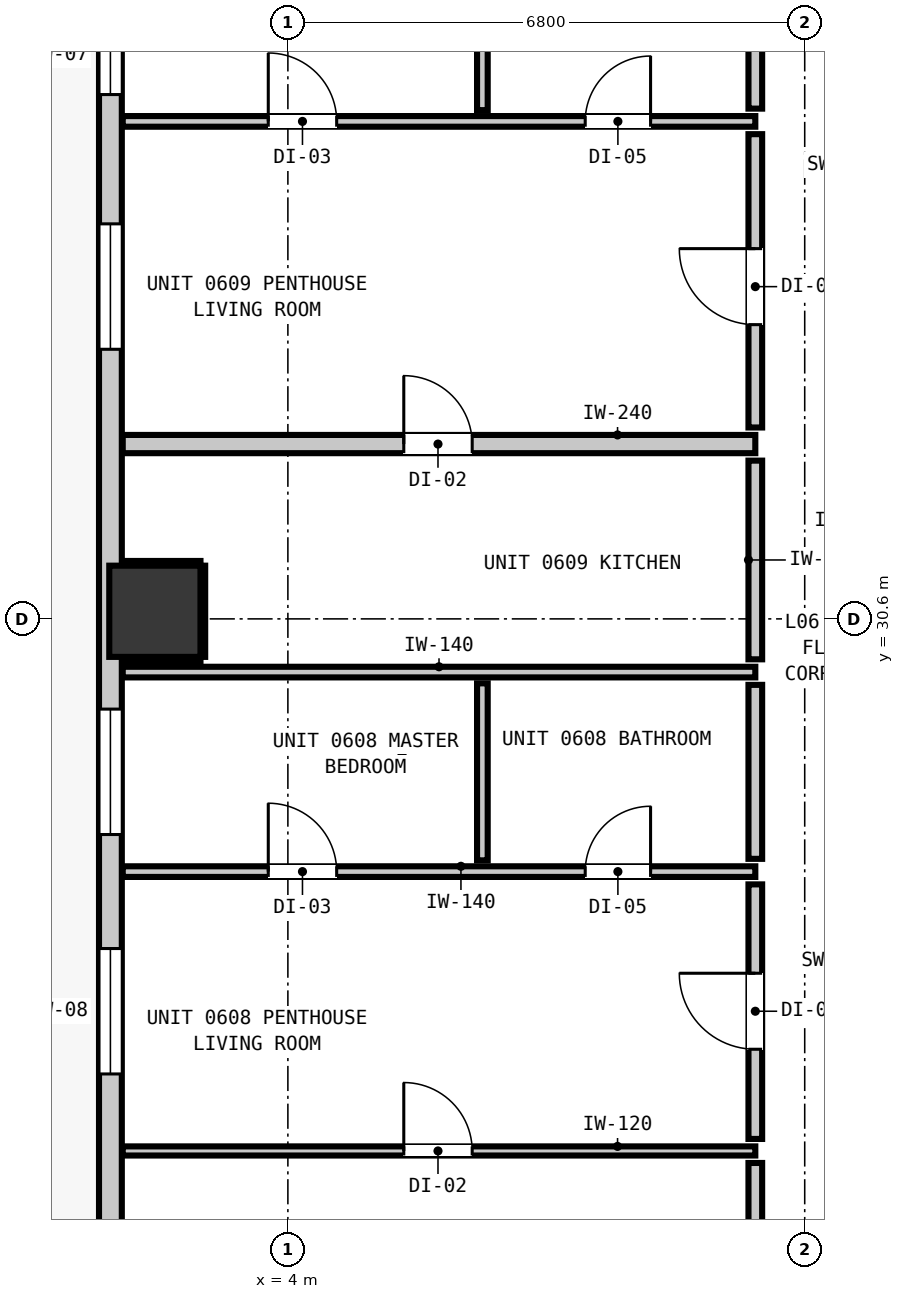
"""IFC4 building model, lengths in metres.
Left out: names, types, materials, properties, quantities, classifications, styles, units other than length and angle.
Written with IfcOpenShell. Run it as: python <this file> out.ifc"""

import sys

from ifc_helpers import new_model, si_unit, direction, frame, frame_2d, origin, origin_2d, place, context, subcontext, project, spatial, rectangle, extrude, element, fill, save


model = new_model("IFC4")
c1 = context("Model", 3, precision=1e-05, world=origin(), true_north=direction((0.0, 1.0)))
c2 = subcontext(c1, "Body", "Model", "MODEL_VIEW")
j1 = project(units=[si_unit("LENGTHUNIT", "METRE"), si_unit("PLANEANGLEUNIT", "RADIAN")], contexts=[c1])
p1 = place(None, origin())
s1 = spatial("IfcSite", under=j1, at=p1, CompositionType="ELEMENT")
p2 = place(p1, origin())
s2 = spatial("IfcBuilding", under=s1, at=p2, CompositionType="ELEMENT")
p3 = place(p2, frame((0.0, 0.0, 25.32)))
s3 = spatial("IfcBuildingStorey", under=s2, at=p3, CompositionType="ELEMENT", Elevation=25.32)
p4 = place(p3, frame((2.25, 30.7, 0.0), z_axis=(0.0, 0.0, 1.0), x_axis=(1.0, 0.0, 0.0)))
e1 = element("IfcColumn", 1, at=p4, inside=s3, PredefinedType="COLUMN", context=c2, shape_type="SweptSolid", body=[
    extrude(rectangle(XDim=1.2, YDim=1.2, at=origin_2d()), origin(), (0.0, 0.0, 1.0), 3.32),
])
p5 = place(p3, frame((1.665, 10.165, 0.0), z_axis=(0.0, 0.0, 1.0), x_axis=(0.0, 1.0, 0.0)))
e2 = element("IfcWall", 2, at=p5, inside=s3, PredefinedType="STANDARD", context=c2, shape_type="SweptSolid", body=[
    extrude(rectangle(XDim=34.67, YDim=0.3, at=frame_2d((17.335, 0.0))), origin(), (0.0, 0.0, 1.0), 3.06),
])
p6 = place(p5, frame((3.352, 0.0, 0.0)))
e3 = element("IfcOpeningElement", 3, at=p6, cuts=e2, PredefinedType="OPENING", context=c2, shape_type="SweptSolid", body=[
    extrude(rectangle(XDim=1.0, YDim=2.15, at=frame_2d((0.5, 1.075))), frame((0.0, 0.16, 0.0), z_axis=(0.0, -1.0, 0.0), x_axis=(1.0, 0.0, 0.0)), (0.0, 0.0, 1.0), 0.32),
])
p7 = place(p5, frame((14.448, 0.0, 0.85)))
e4 = element("IfcOpeningElement", 4, at=p7, cuts=e2, PredefinedType="OPENING", context=c2, shape_type="SweptSolid", body=[
    extrude(rectangle(XDim=1.65, YDim=1.75, at=frame_2d((0.825, 0.875))), frame((0.0, 0.16, 0.0), z_axis=(0.0, -1.0, 0.0), x_axis=(1.0, 0.0, 0.0)), (0.0, 0.0, 1.0), 0.32),
])
p8 = place(p5, frame((17.598, 0.0, 0.85)))
e5 = element("IfcOpeningElement", 5, at=p8, cuts=e2, PredefinedType="OPENING", context=c2, shape_type="SweptSolid", body=[
    extrude(rectangle(XDim=1.65, YDim=1.75, at=frame_2d((0.825, 0.875))), frame((0.0, 0.16, 0.0), z_axis=(0.0, -1.0, 0.0), x_axis=(1.0, 0.0, 0.0)), (0.0, 0.0, 1.0), 0.32),
])
p9 = place(p5, frame((23.982, 0.0, 0.85)))
e6 = element("IfcOpeningElement", 6, at=p9, cuts=e2, PredefinedType="OPENING", context=c2, shape_type="SweptSolid", body=[
    extrude(rectangle(XDim=1.65, YDim=1.75, at=frame_2d((0.825, 0.875))), frame((0.0, 0.16, 0.0), z_axis=(0.0, -1.0, 0.0), x_axis=(1.0, 0.0, 0.0)), (0.0, 0.0, 1.0), 0.32),
])
p10 = place(p5, frame((27.333, 0.0, 0.85)))
e7 = element("IfcOpeningElement", 7, at=p10, cuts=e2, PredefinedType="OPENING", context=c2, shape_type="SweptSolid", body=[
    extrude(rectangle(XDim=1.05, YDim=1.65, at=frame_2d((0.525, 0.825))), frame((0.0, 0.16, 0.0), z_axis=(0.0, -1.0, 0.0), x_axis=(1.0, 0.0, 0.0)), (0.0, 0.0, 1.0), 0.32),
])
p11 = place(p3, frame((1.827, 32.9, 0.0), z_axis=(0.0, 0.0, 1.0), x_axis=(1.0, 0.0, 0.0)))
e8 = element("IfcWall", 8, at=p11, inside=s3, PredefinedType="PARTITIONING", context=c2, shape_type="SweptSolid", body=[
    extrude(rectangle(XDim=8.323, YDim=0.24, at=frame_2d((4.162, 0.0))), origin(), (0.0, 0.0, 1.0), 3.06),
])
p12 = place(p11, frame((3.698, 0.0, 0.0)))
e9 = element("IfcOpeningElement", 9, at=p12, cuts=e8, PredefinedType="OPENING", context=c2, shape_type="SweptSolid", body=[
    extrude(rectangle(XDim=0.9, YDim=2.1, at=frame_2d((0.45, 1.05))), frame((0.0, 0.13, 0.0), z_axis=(0.0, -1.0, 0.0), x_axis=(1.0, 0.0, 0.0)), (0.0, 0.0, 1.0), 0.26),
])
p13 = place(p3, frame((1.827, 27.275, 0.0), z_axis=(0.0, 0.0, 1.0), x_axis=(1.0, 0.0, 0.0)))
e10 = element("IfcWall", 10, at=p13, inside=s3, PredefinedType="PARTITIONING", context=c2, shape_type="SweptSolid", body=[
    extrude(rectangle(XDim=8.323, YDim=0.14, at=frame_2d((4.162, 0.0))), origin(), (0.0, 0.0, 1.0), 3.06),
])
p14 = place(p13, frame((6.085, 0.0, 0.0)))
e11 = element("IfcOpeningElement", 11, at=p14, cuts=e10, PredefinedType="OPENING", context=c2, shape_type="SweptSolid", body=[
    extrude(rectangle(XDim=0.86, YDim=2.02, at=frame_2d((0.43, 1.01))), frame((0.0, 0.08, 0.0), z_axis=(0.0, -1.0, 0.0), x_axis=(1.0, 0.0, 0.0)), (0.0, 0.0, 1.0), 0.16),
])
p15 = place(p13, frame((1.915, 0.0, 0.0)))
e12 = element("IfcOpeningElement", 12, at=p15, cuts=e10, PredefinedType="OPENING", context=c2, shape_type="SweptSolid", body=[
    extrude(rectangle(XDim=0.9, YDim=2.1, at=frame_2d((0.45, 1.05))), frame((0.0, 0.08, 0.0), z_axis=(0.0, -1.0, 0.0), x_axis=(1.0, 0.0, 0.0)), (0.0, 0.0, 1.0), 0.16),
])
p16 = place(p3, frame((1.827, 29.9, 0.0), z_axis=(0.0, 0.0, 1.0), x_axis=(1.0, 0.0, 0.0)))
e13 = element("IfcWall", 13, at=p16, inside=s3, PredefinedType="PARTITIONING", context=c2, shape_type="SweptSolid", body=[
    extrude(rectangle(XDim=8.323, YDim=0.14, at=frame_2d((4.162, 0.0))), origin(), (0.0, 0.0, 1.0), 3.06),
])
p17 = place(p3, frame((1.827, 37.145, 0.0), z_axis=(0.0, 0.0, 1.0), x_axis=(1.0, 0.0, 0.0)))
e14 = element("IfcWall", 14, at=p17, inside=s3, PredefinedType="PARTITIONING", context=c2, shape_type="SweptSolid", body=[
    extrude(rectangle(XDim=8.323, YDim=0.14, at=frame_2d((4.162, 0.0))), origin(), (0.0, 0.0, 1.0), 3.06),
])
p18 = place(p17, frame((6.085, 0.0, 0.0)))
e15 = element("IfcOpeningElement", 15, at=p18, cuts=e14, PredefinedType="OPENING", context=c2, shape_type="SweptSolid", body=[
    extrude(rectangle(XDim=0.86, YDim=2.02, at=frame_2d((0.43, 1.01))), frame((0.0, 0.08, 0.0), z_axis=(0.0, -1.0, 0.0), x_axis=(1.0, 0.0, 0.0)), (0.0, 0.0, 1.0), 0.16),
])
p19 = place(p17, frame((1.915, 0.0, 0.0)))
e16 = element("IfcOpeningElement", 16, at=p19, cuts=e14, PredefinedType="OPENING", context=c2, shape_type="SweptSolid", body=[
    extrude(rectangle(XDim=0.9, YDim=2.1, at=frame_2d((0.45, 1.05))), frame((0.0, 0.08, 0.0), z_axis=(0.0, -1.0, 0.0), x_axis=(1.0, 0.0, 0.0)), (0.0, 0.0, 1.0), 0.16),
])
p20 = place(p3, frame((1.827, 23.6, 0.0), z_axis=(0.0, 0.0, 1.0), x_axis=(1.0, 0.0, 0.0)))
e17 = element("IfcWall", 17, at=p20, inside=s3, PredefinedType="PARTITIONING", context=c2, shape_type="SweptSolid", body=[
    extrude(rectangle(XDim=8.323, YDim=0.12, at=frame_2d((4.162, 0.0))), origin(), (0.0, 0.0, 1.0), 3.06),
])
p21 = place(p20, frame((3.698, 0.0, 0.0)))
e18 = element("IfcOpeningElement", 18, at=p21, cuts=e17, PredefinedType="OPENING", context=c2, shape_type="SweptSolid", body=[
    extrude(rectangle(XDim=0.9, YDim=2.1, at=frame_2d((0.45, 1.05))), frame((0.0, 0.07, 0.0), z_axis=(0.0, -1.0, 0.0), x_axis=(1.0, 0.0, 0.0)), (0.0, 0.0, 1.0), 0.14),
])
p22 = place(p3, frame((10.15, 21.368, 0.0), z_axis=(0.0, 0.0, 1.0), x_axis=(0.0, 1.0, 0.0)))
e19 = element("IfcWall", 19, at=p22, inside=s3, PredefinedType="PARTITIONING", context=c2, shape_type="SweptSolid", body=[
    extrude(rectangle(XDim=2.074, YDim=0.18, at=frame_2d((1.037, 0.0))), origin(), (0.0, 0.0, 1.0), 3.06),
])
p23 = place(p3, frame((10.15, 23.758, 0.0), z_axis=(0.0, 0.0, 1.0), x_axis=(0.0, 1.0, 0.0)))
e20 = element("IfcWall", 20, at=p23, inside=s3, PredefinedType="PARTITIONING", context=c2, shape_type="SweptSolid", body=[
    extrude(rectangle(XDim=3.349, YDim=0.18, at=frame_2d((1.674, 0.0))), origin(), (0.0, 0.0, 1.0), 3.06),
])
p24 = place(p23, frame((1.18, 0.0, 0.0)))
e21 = element("IfcOpeningElement", 21, at=p24, cuts=e20, PredefinedType="OPENING", context=c2, shape_type="SweptSolid", body=[
    extrude(rectangle(XDim=1.0, YDim=2.15, at=frame_2d((0.5, 1.075))), frame((0.0, 0.1, 0.0), z_axis=(0.0, -1.0, 0.0), x_axis=(1.0, 0.0, 0.0)), (0.0, 0.0, 1.0), 0.2),
])
p25 = place(p3, frame((10.15, 27.443, 0.0), z_axis=(0.0, 0.0, 1.0), x_axis=(0.0, 1.0, 0.0)))
e22 = element("IfcWall", 22, at=p25, inside=s3, PredefinedType="PARTITIONING", context=c2, shape_type="SweptSolid", body=[
    extrude(rectangle(XDim=2.289, YDim=0.18, at=frame_2d((1.145, 0.0))), origin(), (0.0, 0.0, 1.0), 3.06),
])
p26 = place(p3, frame((10.15, 30.068, 0.0), z_axis=(0.0, 0.0, 1.0), x_axis=(0.0, 1.0, 0.0)))
e23 = element("IfcWall", 23, at=p26, inside=s3, PredefinedType="PARTITIONING", context=c2, shape_type="SweptSolid", body=[
    extrude(rectangle(XDim=2.614, YDim=0.18, at=frame_2d((1.307, 0.0))), origin(), (0.0, 0.0, 1.0), 3.06),
])
p27 = place(p3, frame((10.15, 33.118, 0.0), z_axis=(0.0, 0.0, 1.0), x_axis=(0.0, 1.0, 0.0)))
e24 = element("IfcWall", 24, at=p27, inside=s3, PredefinedType="PARTITIONING", context=c2, shape_type="SweptSolid", body=[
    extrude(rectangle(XDim=3.859, YDim=0.18, at=frame_2d((1.93, 0.0))), origin(), (0.0, 0.0, 1.0), 3.06),
])
p28 = place(p27, frame((1.353, 0.0, 0.0)))
e25 = element("IfcOpeningElement", 25, at=p28, cuts=e24, PredefinedType="OPENING", context=c2, shape_type="SweptSolid", body=[
    extrude(rectangle(XDim=1.0, YDim=2.15, at=frame_2d((0.5, 1.075))), frame((0.0, 0.1, 0.0), z_axis=(0.0, -1.0, 0.0), x_axis=(1.0, 0.0, 0.0)), (0.0, 0.0, 1.0), 0.2),
])
p29 = place(p3, frame((10.15, 37.313, 0.0), z_axis=(0.0, 0.0, 1.0), x_axis=(0.0, 1.0, 0.0)))
e26 = element("IfcWall", 26, at=p29, inside=s3, PredefinedType="PARTITIONING", context=c2, shape_type="SweptSolid", body=[
    extrude(rectangle(XDim=2.749, YDim=0.18, at=frame_2d((1.375, 0.0))), origin(), (0.0, 0.0, 1.0), 3.06),
])
p30 = place(p3, frame((6.559, 27.423, 0.0), z_axis=(0.0, 0.0, 1.0), x_axis=(0.0, 1.0, 0.0)))
e27 = element("IfcWall", 27, at=p30, inside=s3, PredefinedType="PARTITIONING", context=c2, shape_type="SweptSolid", body=[
    extrude(rectangle(XDim=2.329, YDim=0.14, at=frame_2d((1.165, 0.0))), origin(), (0.0, 0.0, 1.0), 3.06),
])
p31 = place(p3, frame((6.559, 37.293, 0.0), z_axis=(0.0, 0.0, 1.0), x_axis=(0.0, 1.0, 0.0)))
e28 = element("IfcWall", 28, at=p31, inside=s3, PredefinedType="PARTITIONING", context=c2, shape_type="SweptSolid", body=[
    extrude(rectangle(XDim=2.789, YDim=0.14, at=frame_2d((1.395, 0.0))), origin(), (0.0, 0.0, 1.0), 3.06),
])
for number, where, z_axis, x_axis in (
    (29, (1.83, 30.068, 0.0), (0.0, 0.0, 1.0), (1.0, 0.0, 0.0)),
    (30, (1.83, 31.332, 0.0), (0.0, 0.0, 1.0), (1.0, 0.0, 0.0)),
):
    element("IfcWall", number, at=place(p3, frame(where, z_axis=z_axis, x_axis=x_axis)), inside=s3, PredefinedType="PARTITIONING", context=c2, shape_type="SweptSolid", body=[
        extrude(rectangle(XDim=1.02, YDim=0.06, at=frame_2d((0.51, 0.0))), origin(), (0.0, 0.0, 1.0), 1.45),
    ])
p32 = place(p3, frame((2.882, 30.1, 0.0), z_axis=(0.0, 0.0, 1.0), x_axis=(0.0, 1.0, 0.0)))
e31 = element("IfcWall", 31, at=p32, inside=s3, PredefinedType="PARTITIONING", context=c2, shape_type="SweptSolid", body=[
    extrude(rectangle(XDim=1.2, YDim=0.06, at=frame_2d((0.6, 0.0))), origin(), (0.0, 0.0, 1.0), 1.45),
])
p33 = place(p7, origin())
e32 = element("IfcWindow", 32, at=p33, inside=s3, PartitioningType="SINGLE_PANEL", PredefinedType="WINDOW", context=c2, shape_type="SweptSolid", body=[
    extrude(rectangle(XDim=1.65, YDim=1.75, at=frame_2d((0.825, 0.875))), frame((0.0, 0.03, 0.0), z_axis=(0.0, -1.0, 0.0), x_axis=(1.0, 0.0, 0.0)), (0.0, 0.0, 1.0), 0.06),
])
fill(e4, e32)
p34 = place(p8, origin())
e33 = element("IfcWindow", 33, at=p34, inside=s3, PartitioningType="SINGLE_PANEL", PredefinedType="WINDOW", context=c2, shape_type="SweptSolid", body=[
    extrude(rectangle(XDim=1.65, YDim=1.75, at=frame_2d((0.825, 0.875))), frame((0.0, 0.03, 0.0), z_axis=(0.0, -1.0, 0.0), x_axis=(1.0, 0.0, 0.0)), (0.0, 0.0, 1.0), 0.06),
])
fill(e5, e33)
p35 = place(p9, origin())
e34 = element("IfcWindow", 34, at=p35, inside=s3, PartitioningType="SINGLE_PANEL", PredefinedType="WINDOW", context=c2, shape_type="SweptSolid", body=[
    extrude(rectangle(XDim=1.65, YDim=1.75, at=frame_2d((0.825, 0.875))), frame((0.0, 0.03, 0.0), z_axis=(0.0, -1.0, 0.0), x_axis=(1.0, 0.0, 0.0)), (0.0, 0.0, 1.0), 0.06),
])
fill(e6, e34)
p36 = place(p10, origin())
e35 = element("IfcWindow", 35, at=p36, inside=s3, PartitioningType="SINGLE_PANEL", PredefinedType="WINDOW", context=c2, shape_type="SweptSolid", body=[
    extrude(rectangle(XDim=1.05, YDim=1.65, at=frame_2d((0.525, 0.825))), frame((0.0, 0.03, 0.0), z_axis=(0.0, -1.0, 0.0), x_axis=(1.0, 0.0, 0.0)), (0.0, 0.0, 1.0), 0.06),
])
fill(e7, e35)
p37 = place(p24, origin())
e36 = element("IfcDoor", 36, at=p37, inside=s3, OperationType="SINGLE_SWING_RIGHT", PredefinedType="DOOR", context=c2, shape_type="SweptSolid", body=[
    extrude(rectangle(XDim=1.0, YDim=2.15, at=frame_2d((0.5, 1.075))), frame((0.0, 0.025, 0.0), z_axis=(0.0, -1.0, 0.0), x_axis=(1.0, 0.0, 0.0)), (0.0, 0.0, 1.0), 0.05),
])
fill(e21, e36)
p38 = place(p21, origin())
e37 = element("IfcDoor", 37, at=p38, inside=s3, OperationType="SINGLE_SWING_LEFT", PredefinedType="DOOR", context=c2, shape_type="SweptSolid", body=[
    extrude(rectangle(XDim=0.9, YDim=2.1, at=frame_2d((0.45, 1.05))), frame((0.0, 0.025, 0.0), z_axis=(0.0, -1.0, 0.0), x_axis=(1.0, 0.0, 0.0)), (0.0, 0.0, 1.0), 0.05),
])
fill(e18, e37)
p39 = place(p14, origin())
e38 = element("IfcDoor", 38, at=p39, inside=s3, OperationType="SINGLE_SWING_RIGHT", PredefinedType="DOOR", context=c2, shape_type="SweptSolid", body=[
    extrude(rectangle(XDim=0.86, YDim=2.02, at=frame_2d((0.43, 1.01))), frame((0.0, 0.025, 0.0), z_axis=(0.0, -1.0, 0.0), x_axis=(1.0, 0.0, 0.0)), (0.0, 0.0, 1.0), 0.05),
])
fill(e11, e38)
p40 = place(p15, origin())
e39 = element("IfcDoor", 39, at=p40, inside=s3, OperationType="SINGLE_SWING_LEFT", PredefinedType="DOOR", context=c2, shape_type="SweptSolid", body=[
    extrude(rectangle(XDim=0.9, YDim=2.1, at=frame_2d((0.45, 1.05))), frame((0.0, 0.025, 0.0), z_axis=(0.0, -1.0, 0.0), x_axis=(1.0, 0.0, 0.0)), (0.0, 0.0, 1.0), 0.05),
])
fill(e12, e39)
p41 = place(p28, origin())
e40 = element("IfcDoor", 40, at=p41, inside=s3, OperationType="SINGLE_SWING_RIGHT", PredefinedType="DOOR", context=c2, shape_type="SweptSolid", body=[
    extrude(rectangle(XDim=1.0, YDim=2.15, at=frame_2d((0.5, 1.075))), frame((0.0, 0.025, 0.0), z_axis=(0.0, -1.0, 0.0), x_axis=(1.0, 0.0, 0.0)), (0.0, 0.0, 1.0), 0.05),
])
fill(e25, e40)
p42 = place(p12, origin())
e41 = element("IfcDoor", 41, at=p42, inside=s3, OperationType="SINGLE_SWING_LEFT", PredefinedType="DOOR", context=c2, shape_type="SweptSolid", body=[
    extrude(rectangle(XDim=0.9, YDim=2.1, at=frame_2d((0.45, 1.05))), frame((0.0, 0.025, 0.0), z_axis=(0.0, -1.0, 0.0), x_axis=(1.0, 0.0, 0.0)), (0.0, 0.0, 1.0), 0.05),
])
fill(e9, e41)
p43 = place(p18, origin())
e42 = element("IfcDoor", 42, at=p43, inside=s3, OperationType="SINGLE_SWING_RIGHT", PredefinedType="DOOR", context=c2, shape_type="SweptSolid", body=[
    extrude(rectangle(XDim=0.86, YDim=2.02, at=frame_2d((0.43, 1.01))), frame((0.0, 0.025, 0.0), z_axis=(0.0, -1.0, 0.0), x_axis=(1.0, 0.0, 0.0)), (0.0, 0.0, 1.0), 0.05),
])
fill(e15, e42)
p44 = place(p19, origin())
e43 = element("IfcDoor", 43, at=p44, inside=s3, OperationType="SINGLE_SWING_LEFT", PredefinedType="DOOR", context=c2, shape_type="SweptSolid", body=[
    extrude(rectangle(XDim=0.9, YDim=2.1, at=frame_2d((0.45, 1.05))), frame((0.0, 0.025, 0.0), z_axis=(0.0, -1.0, 0.0), x_axis=(1.0, 0.0, 0.0)), (0.0, 0.0, 1.0), 0.05),
])
fill(e16, e43)
save(model, sys.argv[1])
